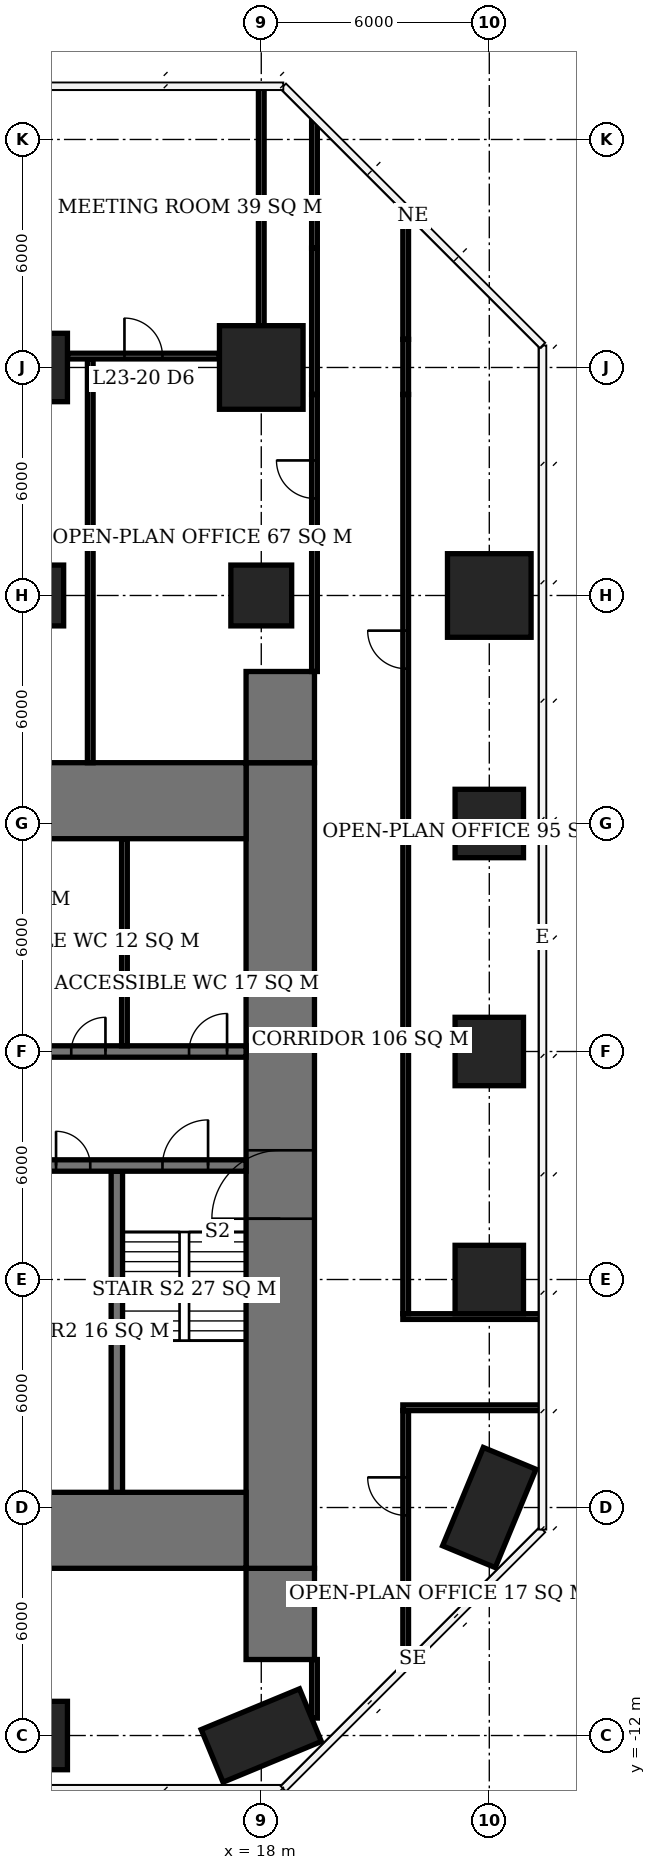
"""IFC4 building model, lengths in metres.
Left out: names, types, materials, properties, quantities, classifications, styles, units other than length and angle.
Written with IfcOpenShell. Run it as: python <this file> out.ifc"""

import sys

from ifc_helpers import new_model, si_unit, direction, frame, frame_2d, origin, origin_2d, place, context, subcontext, project, spatial, rectangle, extrude, element, fill, save


model = new_model("IFC4")
c1 = context("Model", 3, precision=1e-05, world=origin(), true_north=direction((0.0, 1.0)))
c2 = subcontext(c1, "Body", "Model", "MODEL_VIEW")
j1 = project(units=[si_unit("LENGTHUNIT", "METRE"), si_unit("PLANEANGLEUNIT", "RADIAN")], contexts=[c1])
p1 = place(None, origin())
s1 = spatial("IfcSite", under=j1, at=p1, CompositionType="ELEMENT")
p2 = place(p1, origin())
s2 = spatial("IfcBuilding", under=s1, at=p2, CompositionType="ELEMENT")
p3 = place(p2, frame((0.0, 0.0, 97.7)))
s3 = spatial("IfcBuildingStorey", under=s2, at=p3, CompositionType="ELEMENT", Elevation=97.7)
p4 = place(p3, frame((12.0, -12.0, 0.0), z_axis=(0.0, 0.0, 1.0), x_axis=(1.0, 0.0, 0.0)))
e1 = element("IfcColumn", 1, at=p4, inside=s3, PredefinedType="COLUMN", context=c2, shape_type="SweptSolid", body=[
    extrude(rectangle(XDim=1.8, YDim=1.8, at=origin_2d()), origin(), (0.0, 0.0, 1.0), 3.9),
])
p5 = place(p3, frame((12.0, 18.0, 0.0), z_axis=(0.0, 0.0, 1.0), x_axis=(1.0, 0.0, 0.0)))
e2 = element("IfcColumn", 2, at=p5, inside=s3, PredefinedType="COLUMN", context=c2, shape_type="SweptSolid", body=[
    extrude(rectangle(XDim=1.6, YDim=1.6, at=origin_2d()), origin(), (0.0, 0.0, 1.0), 3.9),
])
p6 = place(p3, frame((12.0, 24.0, 0.0), z_axis=(0.0, 0.0, 1.0), x_axis=(1.0, 0.0, 0.0)))
e3 = element("IfcColumn", 3, at=p6, inside=s3, PredefinedType="COLUMN", context=c2, shape_type="SweptSolid", body=[
    extrude(rectangle(XDim=1.8, YDim=1.8, at=origin_2d()), origin(), (0.0, 0.0, 1.0), 3.9),
])
p7 = place(p3, frame((18.0, -12.0, 0.0), z_axis=(0.0, 0.0, 1.0), x_axis=(-0.923879532511, -0.382683432365, 0.0)))
e4 = element("IfcColumn", 4, at=p7, inside=s3, PredefinedType="COLUMN", context=c2, shape_type="SweptSolid", body=[
    extrude(rectangle(XDim=2.8, YDim=1.5, at=origin_2d()), origin(), (0.0, 0.0, 1.0), 3.9),
])
p8 = place(p3, frame((18.0, 18.0, 0.0), z_axis=(0.0, 0.0, 1.0), x_axis=(1.0, 0.0, 0.0)))
e5 = element("IfcColumn", 5, at=p8, inside=s3, PredefinedType="COLUMN", context=c2, shape_type="SweptSolid", body=[
    extrude(rectangle(XDim=1.6, YDim=1.6, at=origin_2d()), origin(), (0.0, 0.0, 1.0), 3.9),
])
p9 = place(p3, frame((18.0, 24.0, 0.0), z_axis=(0.0, 0.0, 1.0), x_axis=(1.0, 0.0, 0.0)))
e6 = element("IfcColumn", 6, at=p9, inside=s3, PredefinedType="COLUMN", context=c2, shape_type="SweptSolid", body=[
    extrude(rectangle(XDim=2.2, YDim=2.2, at=origin_2d()), origin(), (0.0, 0.0, 1.0), 3.9),
])
p10 = place(p3, frame((24.0, -6.0, 0.0), z_axis=(0.0, 0.0, 1.0), x_axis=(-0.382683432365, -0.923879532511, 0.0)))
e7 = element("IfcColumn", 7, at=p10, inside=s3, PredefinedType="COLUMN", context=c2, shape_type="SweptSolid", body=[
    extrude(rectangle(XDim=2.8, YDim=1.5, at=origin_2d()), origin(), (0.0, 0.0, 1.0), 3.9),
])
for number, where, z_axis, x_axis in (
    (8, (24.0, 0.0, 0.0), (0.0, 0.0, 1.0), (1.0, 0.0, 0.0)),
    (9, (24.0, 6.0, 0.0), (0.0, 0.0, 1.0), (1.0, 0.0, 0.0)),
    (10, (24.0, 12.0, 0.0), (0.0, 0.0, 1.0), (1.0, 0.0, 0.0)),
):
    element("IfcColumn", number, at=place(p3, frame(where, z_axis=z_axis, x_axis=x_axis)), inside=s3, PredefinedType="COLUMN", context=c2, shape_type="SweptSolid", body=[
        extrude(rectangle(XDim=1.8, YDim=1.8, at=origin_2d()), origin(), (0.0, 0.0, 1.0), 3.9),
    ])
p11 = place(p3, frame((24.0, 18.0, 0.0), z_axis=(0.0, 0.0, 1.0), x_axis=(1.0, 0.0, 0.0)))
e11 = element("IfcColumn", 11, at=p11, inside=s3, PredefinedType="COLUMN", context=c2, shape_type="SweptSolid", body=[
    extrude(rectangle(XDim=2.2, YDim=2.2, at=origin_2d()), origin(), (0.0, 0.0, 1.0), 3.9),
])
for number, where, z_axis, x_axis in (
    (12, (-5.6, -6.6, 0.0), (0.0, 0.0, 1.0), (1.0, 0.0, 0.0)),
    (13, (-5.6, 12.6, 0.0), (0.0, 0.0, 1.0), (1.0, 0.0, 0.0)),
):
    element("IfcWall", number, at=place(p3, frame(where, z_axis=z_axis, x_axis=x_axis)), inside=s3, PredefinedType="SHEAR", context=c2, shape_type="SweptSolid", body=[
        extrude(rectangle(XDim=23.2, YDim=2.0, at=frame_2d((11.6, 0.0))), origin(), (0.0, 0.0, 1.0), 3.9),
    ])
p12 = place(p3, frame((18.5, -7.6, 0.0), z_axis=(0.0, 0.0, 1.0), x_axis=(0.0, 1.0, 0.0)))
e14 = element("IfcWall", 14, at=p12, inside=s3, PredefinedType="SHEAR", context=c2, shape_type="SweptSolid", body=[
    extrude(rectangle(XDim=21.2, YDim=1.8, at=frame_2d((10.6, 0.0))), origin(), (0.0, 0.0, 1.0), 3.9),
])
p13 = place(p12, frame((9.2, 0.0, 0.0)))
e15 = element("IfcOpeningElement", 15, at=p13, cuts=e14, PredefinedType="OPENING", context=c2, shape_type="SweptSolid", body=[
    extrude(rectangle(XDim=1.8, YDim=2.4, at=frame_2d((0.9, 1.2))), frame((0.0, 0.91, 0.0), z_axis=(0.0, -1.0, 0.0), x_axis=(1.0, 0.0, 0.0)), (0.0, 0.0, 1.0), 1.82),
])
for number, where, z_axis, x_axis in (
    (16, (18.5, -10.0, 0.0), (0.0, 0.0, 1.0), (0.0, 1.0, 0.0)),
    (17, (18.5, 13.6, 0.0), (0.0, 0.0, 1.0), (0.0, 1.0, 0.0)),
):
    element("IfcWall", number, at=place(p3, frame(where, z_axis=z_axis, x_axis=x_axis)), inside=s3, PredefinedType="SHEAR", context=c2, shape_type="SweptSolid", body=[
        extrude(rectangle(XDim=2.4, YDim=1.8, at=frame_2d((1.2, 0.0))), origin(), (0.0, 0.0, 1.0), 3.9),
    ])
p14 = place(p3, frame((12.15, 3.0, 0.0), z_axis=(0.0, 0.0, 1.0), x_axis=(1.0, 0.0, 0.0)))
e18 = element("IfcWall", 18, at=p14, inside=s3, PredefinedType="SHEAR", context=c2, shape_type="SweptSolid", body=[
    extrude(rectangle(XDim=5.45, YDim=0.3, at=frame_2d((2.725, 0.0))), origin(), (0.0, 0.0, 1.0), 3.9),
])
p15 = place(p14, frame((3.25, 0.0, 0.0)))
e19 = element("IfcOpeningElement", 19, at=p15, cuts=e18, PredefinedType="OPENING", context=c2, shape_type="SweptSolid", body=[
    extrude(rectangle(XDim=1.2, YDim=2.1, at=frame_2d((0.6, 1.05))), frame((0.0, 0.16, 0.0), z_axis=(0.0, -1.0, 0.0), x_axis=(1.0, 0.0, 0.0)), (0.0, 0.0, 1.0), 0.32),
])
p16 = place(p14, frame((0.45, 0.0, 0.0)))
e20 = element("IfcOpeningElement", 20, at=p16, cuts=e18, PredefinedType="OPENING", context=c2, shape_type="SweptSolid", body=[
    extrude(rectangle(XDim=0.9, YDim=2.1, at=frame_2d((0.45, 1.05))), frame((0.0, 0.16, 0.0), z_axis=(0.0, -1.0, 0.0), x_axis=(1.0, 0.0, 0.0)), (0.0, 0.0, 1.0), 0.32),
])
p17 = place(p3, frame((-0.15, 6.0, 0.0), z_axis=(0.0, 0.0, 1.0), x_axis=(1.0, 0.0, 0.0)))
e21 = element("IfcWall", 21, at=p17, inside=s3, PredefinedType="SHEAR", context=c2, shape_type="SweptSolid", body=[
    extrude(rectangle(XDim=17.75, YDim=0.3, at=frame_2d((8.875, 0.0))), origin(), (0.0, 0.0, 1.0), 3.9),
])
p18 = place(p17, frame((13.15, 0.0, 0.0)))
e22 = element("IfcOpeningElement", 22, at=p18, cuts=e21, PredefinedType="OPENING", context=c2, shape_type="SweptSolid", body=[
    extrude(rectangle(XDim=0.9, YDim=2.1, at=frame_2d((0.45, 1.05))), frame((0.0, 0.16, 0.0), z_axis=(0.0, -1.0, 0.0), x_axis=(1.0, 0.0, 0.0)), (0.0, 0.0, 1.0), 0.32),
])
p19 = place(p17, frame((16.25, 0.0, 0.0)))
e23 = element("IfcOpeningElement", 23, at=p19, cuts=e21, PredefinedType="OPENING", context=c2, shape_type="SweptSolid", body=[
    extrude(rectangle(XDim=1.0, YDim=2.1, at=frame_2d((0.5, 1.05))), frame((0.0, 0.16, 0.0), z_axis=(0.0, -1.0, 0.0), x_axis=(1.0, 0.0, 0.0)), (0.0, 0.0, 1.0), 0.32),
])
p20 = place(p17, frame((7.25, 0.0, 0.0)))
e24 = element("IfcOpeningElement", 24, at=p20, cuts=e21, PredefinedType="OPENING", context=c2, shape_type="SweptSolid", body=[
    extrude(rectangle(XDim=1.0, YDim=2.1, at=frame_2d((0.5, 1.05))), frame((0.0, 0.16, 0.0), z_axis=(0.0, -1.0, 0.0), x_axis=(1.0, 0.0, 0.0)), (0.0, 0.0, 1.0), 0.32),
])
p21 = place(p17, frame((1.1, 0.0, 0.0)))
e25 = element("IfcOpeningElement", 25, at=p21, cuts=e21, PredefinedType="OPENING", context=c2, shape_type="SweptSolid", body=[
    extrude(rectangle(XDim=1.1, YDim=2.1, at=frame_2d((0.55, 1.05))), frame((0.0, 0.16, 0.0), z_axis=(0.0, -1.0, 0.0), x_axis=(1.0, 0.0, 0.0)), (0.0, 0.0, 1.0), 0.32),
])
p22 = place(p17, frame((4.1, 0.0, 0.0)))
e26 = element("IfcOpeningElement", 26, at=p22, cuts=e21, PredefinedType="OPENING", context=c2, shape_type="SweptSolid", body=[
    extrude(rectangle(XDim=1.1, YDim=2.1, at=frame_2d((0.55, 1.05))), frame((0.0, 0.16, 0.0), z_axis=(0.0, -1.0, 0.0), x_axis=(1.0, 0.0, 0.0)), (0.0, 0.0, 1.0), 0.32),
])
p23 = place(p3, frame((14.2, -5.6, 0.0), z_axis=(0.0, 0.0, 1.0), x_axis=(0.0, 1.0, 0.0)))
e27 = element("IfcWall", 27, at=p23, inside=s3, PredefinedType="SHEAR", context=c2, shape_type="SweptSolid", body=[
    extrude(rectangle(XDim=8.45, YDim=0.3, at=frame_2d((4.225, 0.0))), origin(), (0.0, 0.0, 1.0), 3.9),
])
p24 = place(p3, frame((14.4, 6.15, 0.0), z_axis=(0.0, 0.0, 1.0), x_axis=(0.0, 1.0, 0.0)))
e28 = element("IfcWall", 28, at=p24, inside=s3, PredefinedType="PLUMBINGWALL", context=c2, shape_type="SweptSolid", body=[
    extrude(rectangle(XDim=5.45, YDim=0.15, at=frame_2d((2.725, 0.0))), origin(), (0.0, 0.0, 1.0), 3.65),
])
p25 = place(p3, frame((12.9, 24.3, 0.0), z_axis=(0.0, 0.0, 1.0), x_axis=(1.0, 0.0, 0.0)))
e29 = element("IfcWall", 29, at=p25, inside=s3, PredefinedType="PARTITIONING", context=c2, shape_type="SweptSolid", body=[
    extrude(rectangle(XDim=4.0, YDim=0.15, at=frame_2d((2.0, 0.0))), origin(), (0.0, 0.0, 1.0), 3.65),
])
p26 = place(p25, frame((1.5, 0.0, 0.0)))
e30 = element("IfcOpeningElement", 30, at=p26, cuts=e29, PredefinedType="OPENING", context=c2, shape_type="SweptSolid", body=[
    extrude(rectangle(XDim=1.0, YDim=2.1, at=frame_2d((0.5, 1.05))), frame((0.0, 0.085, 0.0), z_axis=(0.0, -1.0, 0.0), x_axis=(1.0, 0.0, 0.0)), (0.0, 0.0, 1.0), 0.17),
])
p27 = place(p3, frame((18.0, 25.1, 0.0), z_axis=(0.0, 0.0, 1.0), x_axis=(0.0, 1.0, 0.0)))
e31 = element("IfcWall", 31, at=p27, inside=s3, PredefinedType="PARTITIONING", context=c2, shape_type="SweptSolid", body=[
    extrude(rectangle(XDim=3.21, YDim=0.15, at=frame_2d((1.605, 0.0))), origin(), (0.0, 0.0, 1.0), 2.65),
])
p28 = place(p3, frame((18.0, 28.31, 0.0), z_axis=(0.0, 0.0, 1.0), x_axis=(0.0, 1.0, 0.0)))
e32 = element("IfcWall", 32, at=p28, inside=s3, PredefinedType="PARTITIONING", context=c2, shape_type="SweptSolid", body=[
    extrude(rectangle(XDim=3.09, YDim=0.15, at=frame_2d((1.545, 0.0))), origin(), (0.0, 0.0, 1.0), 3.65),
])
p29 = place(p3, frame((13.5, 13.6, 0.0), z_axis=(0.0, 0.0, 1.0), x_axis=(0.0, 1.0, 0.0)))
e33 = element("IfcWall", 33, at=p29, inside=s3, PredefinedType="PARTITIONING", context=c2, shape_type="SweptSolid", body=[
    extrude(rectangle(XDim=10.625, YDim=0.15, at=frame_2d((5.312, 0.0))), origin(), (0.0, 0.0, 1.0), 3.65),
])
p30 = place(p3, frame((19.4, -11.541, 0.0), z_axis=(0.0, 0.0, 1.0), x_axis=(0.0, 1.0, 0.0)))
e34 = element("IfcWall", 34, at=p30, inside=s3, PredefinedType="PARTITIONING", context=c2, shape_type="SweptSolid", body=[
    extrude(rectangle(XDim=1.541, YDim=0.15, at=frame_2d((0.77, 0.0))), origin(), (0.0, 0.0, 1.0), 3.65),
])
p31 = place(p3, frame((19.4, 16.0, 0.0), z_axis=(0.0, 0.0, 1.0), x_axis=(0.0, 1.0, 0.0)))
e35 = element("IfcWall", 35, at=p31, inside=s3, PredefinedType="PARTITIONING", context=c2, shape_type="SweptSolid", body=[
    extrude(rectangle(XDim=7.29, YDim=0.15, at=frame_2d((3.645, 0.0))), origin(), (0.0, 0.0, 1.0), 3.65),
])
p32 = place(p31, frame((4.554, 0.0, 0.0)))
e36 = element("IfcOpeningElement", 36, at=p32, cuts=e35, PredefinedType="OPENING", context=c2, shape_type="SweptSolid", body=[
    extrude(rectangle(XDim=1.0, YDim=2.1, at=frame_2d((0.5, 1.05))), frame((0.0, 0.085, 0.0), z_axis=(0.0, -1.0, 0.0), x_axis=(1.0, 0.0, 0.0)), (0.0, 0.0, 1.0), 0.17),
])
p33 = place(p3, frame((19.4, 23.29, 0.0), z_axis=(0.0, 0.0, 1.0), x_axis=(0.0, 1.0, 0.0)))
e37 = element("IfcWall", 37, at=p33, inside=s3, PredefinedType="PARTITIONING", context=c2, shape_type="SweptSolid", body=[
    extrude(rectangle(XDim=3.85, YDim=0.15, at=frame_2d((1.925, 0.0))), origin(), (0.0, 0.0, 1.0), 2.65),
])
p34 = place(p3, frame((19.4, 27.14, 0.0), z_axis=(0.0, 0.0, 1.0), x_axis=(0.0, 1.0, 0.0)))
e38 = element("IfcWall", 38, at=p34, inside=s3, PredefinedType="PARTITIONING", context=c2, shape_type="SweptSolid", body=[
    extrude(rectangle(XDim=3.349, YDim=0.15, at=frame_2d((1.675, 0.0))), origin(), (0.0, 0.0, 1.0), 3.65),
])
p35 = place(p3, frame((21.8, -10.089, 0.0), z_axis=(0.0, 0.0, 1.0), x_axis=(0.0, 1.0, 0.0)))
e39 = element("IfcWall", 39, at=p35, inside=s3, PredefinedType="PARTITIONING", context=c2, shape_type="SweptSolid", body=[
    extrude(rectangle(XDim=6.639, YDim=0.15, at=frame_2d((3.32, 0.0))), origin(), (0.0, 0.0, 1.0), 3.65),
])
p36 = place(p35, frame((3.882, 0.0, 0.0)))
e40 = element("IfcOpeningElement", 40, at=p36, cuts=e39, PredefinedType="OPENING", context=c2, shape_type="SweptSolid", body=[
    extrude(rectangle(XDim=1.0, YDim=2.1, at=frame_2d((0.5, 1.05))), frame((0.0, 0.085, 0.0), z_axis=(0.0, -1.0, 0.0), x_axis=(1.0, 0.0, 0.0)), (0.0, 0.0, 1.0), 0.17),
])
p37 = place(p3, frame((21.725, -3.375, 0.0), z_axis=(0.0, 0.0, 1.0), x_axis=(1.0, 0.0, 0.0)))
e41 = element("IfcWall", 41, at=p37, inside=s3, PredefinedType="PARTITIONING", context=c2, shape_type="SweptSolid", body=[
    extrude(rectangle(XDim=3.625, YDim=0.15, at=frame_2d((1.812, 0.0))), origin(), (0.0, 0.0, 1.0), 3.65),
])
p38 = place(p3, frame((21.8, -0.9, 0.0), z_axis=(0.0, 0.0, 1.0), x_axis=(0.0, 1.0, 0.0)))
e42 = element("IfcWall", 42, at=p38, inside=s3, PredefinedType="PARTITIONING", context=c2, shape_type="SweptSolid", body=[
    extrude(rectangle(XDim=24.19, YDim=0.15, at=frame_2d((12.095, 0.0))), origin(), (0.0, 0.0, 1.0), 3.65),
])
p39 = place(p38, frame((16.975, 0.0, 0.0)))
e43 = element("IfcOpeningElement", 43, at=p39, cuts=e42, PredefinedType="OPENING", context=c2, shape_type="SweptSolid", body=[
    extrude(rectangle(XDim=1.0, YDim=2.1, at=frame_2d((0.5, 1.05))), frame((0.0, 0.085, 0.0), z_axis=(0.0, -1.0, 0.0), x_axis=(1.0, 0.0, 0.0)), (0.0, 0.0, 1.0), 0.17),
])
p40 = place(p3, frame((21.8, 23.29, 0.0), z_axis=(0.0, 0.0, 1.0), x_axis=(0.0, 1.0, 0.0)))
e44 = element("IfcWall", 44, at=p40, inside=s3, PredefinedType="PARTITIONING", context=c2, shape_type="SweptSolid", body=[
    extrude(rectangle(XDim=1.45, YDim=0.15, at=frame_2d((0.725, 0.0))), origin(), (0.0, 0.0, 1.0), 2.65),
])
p41 = place(p3, frame((21.8, 24.74, 0.0), z_axis=(0.0, 0.0, 1.0), x_axis=(0.0, 1.0, 0.0)))
e45 = element("IfcWall", 45, at=p41, inside=s3, PredefinedType="PARTITIONING", context=c2, shape_type="SweptSolid", body=[
    extrude(rectangle(XDim=3.349, YDim=0.15, at=frame_2d((1.675, 0.0))), origin(), (0.0, 0.0, 1.0), 3.65),
])
p42 = place(p3, frame((21.725, -0.975, 0.0), z_axis=(0.0, 0.0, 1.0), x_axis=(1.0, 0.0, 0.0)))
e46 = element("IfcWall", 46, at=p42, inside=s3, PredefinedType="PARTITIONING", context=c2, shape_type="SweptSolid", body=[
    extrude(rectangle(XDim=3.675, YDim=0.15, at=frame_2d((1.837, 0.0))), origin(), (0.0, 0.0, 1.0), 3.65),
])
p43 = place(p13, origin())
e47 = element("IfcDoor", 47, at=p43, inside=s3, OperationType="DOUBLE_DOOR_SINGLE_SWING", PredefinedType="DOOR", context=c2, shape_type="SweptSolid", body=[
    extrude(rectangle(XDim=1.8, YDim=2.4, at=frame_2d((0.9, 1.2))), frame((0.0, 0.025, 0.0), z_axis=(0.0, -1.0, 0.0), x_axis=(1.0, 0.0, 0.0)), (0.0, 0.0, 1.0), 0.05),
])
fill(e15, e47)
p44 = place(p15, origin())
e48 = element("IfcDoor", 48, at=p44, inside=s3, OperationType="SINGLE_SWING_RIGHT", PredefinedType="DOOR", context=c2, shape_type="SweptSolid", body=[
    extrude(rectangle(XDim=1.2, YDim=2.1, at=frame_2d((0.6, 1.05))), frame((0.0, 0.025, 0.0), z_axis=(0.0, -1.0, 0.0), x_axis=(1.0, 0.0, 0.0)), (0.0, 0.0, 1.0), 0.05),
])
fill(e19, e48)
p45 = place(p16, origin())
e49 = element("IfcDoor", 49, at=p45, inside=s3, OperationType="SINGLE_SWING_LEFT", PredefinedType="DOOR", context=c2, shape_type="SweptSolid", body=[
    extrude(rectangle(XDim=0.9, YDim=2.1, at=frame_2d((0.45, 1.05))), frame((0.0, 0.025, 0.0), z_axis=(0.0, -1.0, 0.0), x_axis=(1.0, 0.0, 0.0)), (0.0, 0.0, 1.0), 0.05),
])
fill(e20, e49)
p46 = place(p18, origin())
e50 = element("IfcDoor", 50, at=p46, inside=s3, OperationType="SINGLE_SWING_RIGHT", PredefinedType="DOOR", context=c2, shape_type="SweptSolid", body=[
    extrude(rectangle(XDim=0.9, YDim=2.1, at=frame_2d((0.45, 1.05))), frame((0.0, 0.025, 0.0), z_axis=(0.0, -1.0, 0.0), x_axis=(1.0, 0.0, 0.0)), (0.0, 0.0, 1.0), 0.05),
])
fill(e22, e50)
p47 = place(p19, origin())
e51 = element("IfcDoor", 51, at=p47, inside=s3, OperationType="SINGLE_SWING_RIGHT", PredefinedType="DOOR", context=c2, shape_type="SweptSolid", body=[
    extrude(rectangle(XDim=1.0, YDim=2.1, at=frame_2d((0.5, 1.05))), frame((0.0, 0.025, 0.0), z_axis=(0.0, -1.0, 0.0), x_axis=(1.0, 0.0, 0.0)), (0.0, 0.0, 1.0), 0.05),
])
fill(e23, e51)
p48 = place(p26, origin())
e52 = element("IfcDoor", 52, at=p48, inside=s3, OperationType="SINGLE_SWING_LEFT", PredefinedType="DOOR", context=c2, shape_type="SweptSolid", body=[
    extrude(rectangle(XDim=1.0, YDim=2.1, at=frame_2d((0.5, 1.05))), frame((0.0, 0.025, 0.0), z_axis=(0.0, -1.0, 0.0), x_axis=(1.0, 0.0, 0.0)), (0.0, 0.0, 1.0), 0.05),
])
fill(e30, e52)
p49 = place(p36, origin())
e53 = element("IfcDoor", 53, at=p49, inside=s3, OperationType="SINGLE_SWING_RIGHT", PredefinedType="DOOR", context=c2, shape_type="SweptSolid", body=[
    extrude(rectangle(XDim=1.0, YDim=2.1, at=frame_2d((0.5, 1.05))), frame((0.0, 0.025, 0.0), z_axis=(0.0, -1.0, 0.0), x_axis=(1.0, 0.0, 0.0)), (0.0, 0.0, 1.0), 0.05),
])
fill(e40, e53)
p50 = place(p39, origin())
e54 = element("IfcDoor", 54, at=p50, inside=s3, OperationType="SINGLE_SWING_RIGHT", PredefinedType="DOOR", context=c2, shape_type="SweptSolid", body=[
    extrude(rectangle(XDim=1.0, YDim=2.1, at=frame_2d((0.5, 1.05))), frame((0.0, 0.025, 0.0), z_axis=(0.0, -1.0, 0.0), x_axis=(1.0, 0.0, 0.0)), (0.0, 0.0, 1.0), 0.05),
])
fill(e43, e54)
p51 = place(p32, origin())
e55 = element("IfcDoor", 55, at=p51, inside=s3, OperationType="SINGLE_SWING_RIGHT", PredefinedType="DOOR", context=c2, shape_type="SweptSolid", body=[
    extrude(rectangle(XDim=1.0, YDim=2.1, at=frame_2d((0.5, 1.05))), frame((0.0, 0.025, 0.0), z_axis=(0.0, -1.0, 0.0), x_axis=(1.0, 0.0, 0.0)), (0.0, 0.0, 1.0), 0.05),
])
fill(e36, e55)
save(model, sys.argv[1])
